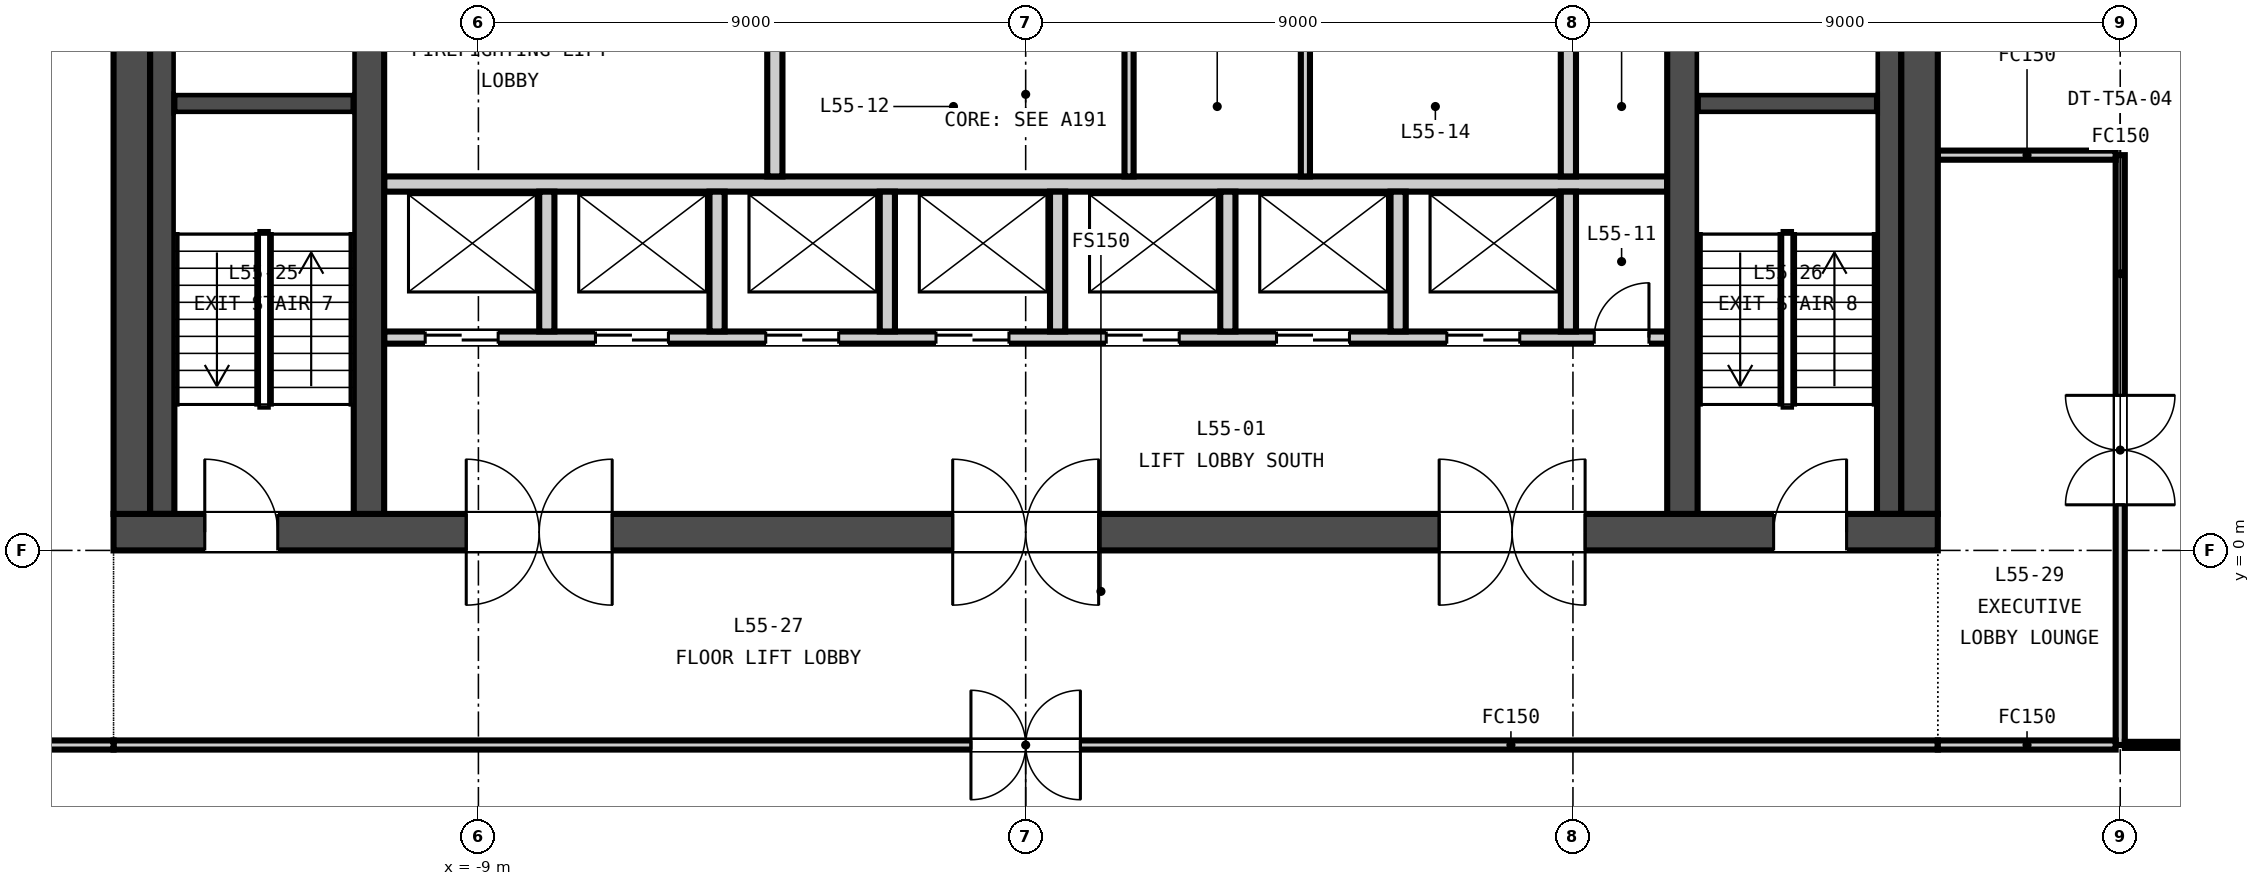
"""IFC4 building model, lengths in metres.
Left out: names, types, materials, properties, quantities, classifications, styles, units other than length and angle.
Written with IfcOpenShell. Run it as: python <this file> out.ifc"""

import sys

from ifc_helpers import new_model, si_unit, direction, frame, frame_2d, origin, place, context, subcontext, project, spatial, rectangle, extrude, element, fill, save


model = new_model("IFC4")
c1 = context("Model", 3, precision=1e-05, world=origin(), true_north=direction((0.0, 1.0)))
c2 = subcontext(c1, "Body", "Model", "MODEL_VIEW")
j1 = project(units=[si_unit("LENGTHUNIT", "METRE"), si_unit("PLANEANGLEUNIT", "RADIAN")], contexts=[c1])
p1 = place(None, origin())
s1 = spatial("IfcSite", under=j1, at=p1, CompositionType="ELEMENT")
p2 = place(p1, origin())
s2 = spatial("IfcBuilding", under=s1, at=p2, CompositionType="ELEMENT")
p3 = place(p2, frame((0.0, 0.0, 219.95)))
s3 = spatial("IfcBuildingStorey", under=s2, at=p3, CompositionType="ELEMENT", Elevation=219.95)
p4 = place(p3, frame((-15.0, 0.3, -0.15), z_axis=(0.0, 0.0, 1.0), x_axis=(1.0, 0.0, 0.0)))
e1 = element("IfcWall", 1, at=p4, inside=s3, PredefinedType="SOLIDWALL", context=c2, shape_type="SweptSolid", body=[
    extrude(rectangle(XDim=30.0, YDim=0.6, at=frame_2d((15.0, 0.0))), origin(), (0.0, 0.0, 1.0), 3.65),
])
p5 = place(p4, frame((5.8, 0.0, 0.15)))
e2 = element("IfcOpeningElement", 2, at=p5, cuts=e1, PredefinedType="OPENING", context=c2, shape_type="SweptSolid", body=[
    extrude(rectangle(XDim=2.4, YDim=2.4, at=frame_2d((1.2, 1.2))), frame((0.0, 0.31, 0.0), z_axis=(0.0, -1.0, 0.0), x_axis=(1.0, 0.0, 0.0)), (0.0, 0.0, 1.0), 0.62),
])
p6 = place(p4, frame((13.8, 0.0, 0.15)))
e3 = element("IfcOpeningElement", 3, at=p6, cuts=e1, PredefinedType="OPENING", context=c2, shape_type="SweptSolid", body=[
    extrude(rectangle(XDim=2.4, YDim=2.4, at=frame_2d((1.2, 1.2))), frame((0.0, 0.31, 0.0), z_axis=(0.0, -1.0, 0.0), x_axis=(1.0, 0.0, 0.0)), (0.0, 0.0, 1.0), 0.62),
])
p7 = place(p4, frame((21.8, 0.0, 0.15)))
e4 = element("IfcOpeningElement", 4, at=p7, cuts=e1, PredefinedType="OPENING", context=c2, shape_type="SweptSolid", body=[
    extrude(rectangle(XDim=2.4, YDim=2.4, at=frame_2d((1.2, 1.2))), frame((0.0, 0.31, 0.0), z_axis=(0.0, -1.0, 0.0), x_axis=(1.0, 0.0, 0.0)), (0.0, 0.0, 1.0), 0.62),
])
p8 = place(p4, frame((1.5, 0.0, 0.15)))
e5 = element("IfcOpeningElement", 5, at=p8, cuts=e1, PredefinedType="OPENING", context=c2, shape_type="SweptSolid", body=[
    extrude(rectangle(XDim=1.2, YDim=2.1, at=frame_2d((0.6, 1.05))), frame((0.0, 0.31, 0.0), z_axis=(0.0, -1.0, 0.0), x_axis=(1.0, 0.0, 0.0)), (0.0, 0.0, 1.0), 0.62),
])
p9 = place(p4, frame((27.3, 0.0, 0.15)))
e6 = element("IfcOpeningElement", 6, at=p9, cuts=e1, PredefinedType="OPENING", context=c2, shape_type="SweptSolid", body=[
    extrude(rectangle(XDim=1.2, YDim=2.1, at=frame_2d((0.6, 1.05))), frame((0.0, 0.31, 0.0), z_axis=(0.0, -1.0, 0.0), x_axis=(1.0, 0.0, 0.0)), (0.0, 0.0, 1.0), 0.62),
])
for number, where, z_axis, x_axis in (
    (7, (-14.7, 0.6, -0.15), (0.0, 0.0, 1.0), (0.0, 1.0, 0.0)),
    (8, (14.7, 0.6, -0.15), (0.0, 0.0, 1.0), (0.0, 1.0, 0.0)),
):
    element("IfcWall", number, at=place(p3, frame(where, z_axis=z_axis, x_axis=x_axis)), inside=s3, PredefinedType="SOLIDWALL", context=c2, shape_type="SweptSolid", body=[
        extrude(rectangle(XDim=13.8, YDim=0.6, at=frame_2d((6.9, 0.0))), origin(), (0.0, 0.0, 1.0), 3.65),
    ])
for number, where, z_axis, x_axis in (
    (9, (-10.8, 0.6, -0.15), (0.0, 0.0, 1.0), (0.0, 1.0, 0.0)),
    (10, (10.8, 0.6, -0.15), (0.0, 0.0, 1.0), (0.0, 1.0, 0.0)),
):
    element("IfcWall", number, at=place(p3, frame(where, z_axis=z_axis, x_axis=x_axis)), inside=s3, PredefinedType="SOLIDWALL", context=c2, shape_type="SweptSolid", body=[
        extrude(rectangle(XDim=13.8, YDim=0.5, at=frame_2d((6.9, 0.0))), origin(), (0.0, 0.0, 1.0), 3.65),
    ])
p10 = place(p3, frame((-10.55, 3.5, 0.0), z_axis=(0.0, 0.0, 1.0), x_axis=(1.0, 0.0, 0.0)))
e11 = element("IfcWall", 11, at=p10, inside=s3, PredefinedType="PARTITIONING", context=c2, shape_type="SweptSolid", body=[
    extrude(rectangle(XDim=21.1, YDim=0.2, at=frame_2d((10.55, 0.0))), origin(), (0.0, 0.0, 1.0), 3.5),
])
p11 = place(p10, frame((0.675, 0.0, 0.0)))
e12 = element("IfcOpeningElement", 12, at=p11, cuts=e11, PredefinedType="OPENING", context=c2, shape_type="SweptSolid", body=[
    extrude(rectangle(XDim=1.2, YDim=2.1, at=frame_2d((0.6, 1.05))), frame((0.0, 0.11, 0.0), z_axis=(0.0, -1.0, 0.0), x_axis=(1.0, 0.0, 0.0)), (0.0, 0.0, 1.0), 0.22),
])
p12 = place(p10, frame((3.475, 0.0, 0.0)))
e13 = element("IfcOpeningElement", 13, at=p12, cuts=e11, PredefinedType="OPENING", context=c2, shape_type="SweptSolid", body=[
    extrude(rectangle(XDim=1.2, YDim=2.1, at=frame_2d((0.6, 1.05))), frame((0.0, 0.11, 0.0), z_axis=(0.0, -1.0, 0.0), x_axis=(1.0, 0.0, 0.0)), (0.0, 0.0, 1.0), 0.22),
])
p13 = place(p10, frame((6.275, 0.0, 0.0)))
e14 = element("IfcOpeningElement", 14, at=p13, cuts=e11, PredefinedType="OPENING", context=c2, shape_type="SweptSolid", body=[
    extrude(rectangle(XDim=1.2, YDim=2.1, at=frame_2d((0.6, 1.05))), frame((0.0, 0.11, 0.0), z_axis=(0.0, -1.0, 0.0), x_axis=(1.0, 0.0, 0.0)), (0.0, 0.0, 1.0), 0.22),
])
p14 = place(p10, frame((9.075, 0.0, 0.0)))
e15 = element("IfcOpeningElement", 15, at=p14, cuts=e11, PredefinedType="OPENING", context=c2, shape_type="SweptSolid", body=[
    extrude(rectangle(XDim=1.2, YDim=2.1, at=frame_2d((0.6, 1.05))), frame((0.0, 0.11, 0.0), z_axis=(0.0, -1.0, 0.0), x_axis=(1.0, 0.0, 0.0)), (0.0, 0.0, 1.0), 0.22),
])
p15 = place(p10, frame((11.875, 0.0, 0.0)))
e16 = element("IfcOpeningElement", 16, at=p15, cuts=e11, PredefinedType="OPENING", context=c2, shape_type="SweptSolid", body=[
    extrude(rectangle(XDim=1.2, YDim=2.1, at=frame_2d((0.6, 1.05))), frame((0.0, 0.11, 0.0), z_axis=(0.0, -1.0, 0.0), x_axis=(1.0, 0.0, 0.0)), (0.0, 0.0, 1.0), 0.22),
])
p16 = place(p10, frame((14.675, 0.0, 0.0)))
e17 = element("IfcOpeningElement", 17, at=p16, cuts=e11, PredefinedType="OPENING", context=c2, shape_type="SweptSolid", body=[
    extrude(rectangle(XDim=1.2, YDim=2.1, at=frame_2d((0.6, 1.05))), frame((0.0, 0.11, 0.0), z_axis=(0.0, -1.0, 0.0), x_axis=(1.0, 0.0, 0.0)), (0.0, 0.0, 1.0), 0.22),
])
p17 = place(p10, frame((17.475, 0.0, 0.0)))
e18 = element("IfcOpeningElement", 18, at=p17, cuts=e11, PredefinedType="OPENING", context=c2, shape_type="SweptSolid", body=[
    extrude(rectangle(XDim=1.2, YDim=2.1, at=frame_2d((0.6, 1.05))), frame((0.0, 0.11, 0.0), z_axis=(0.0, -1.0, 0.0), x_axis=(1.0, 0.0, 0.0)), (0.0, 0.0, 1.0), 0.22),
])
p18 = place(p10, frame((19.9, 0.0, 0.0)))
e19 = element("IfcOpeningElement", 19, at=p18, cuts=e11, PredefinedType="OPENING", context=c2, shape_type="SweptSolid", body=[
    extrude(rectangle(XDim=0.9, YDim=2.1, at=frame_2d((0.45, 1.05))), frame((0.0, 0.11, 0.0), z_axis=(0.0, -1.0, 0.0), x_axis=(1.0, 0.0, 0.0)), (0.0, 0.0, 1.0), 0.22),
])
p19 = place(p3, frame((-10.55, 6.025, 0.0), z_axis=(0.0, 0.0, 1.0), x_axis=(1.0, 0.0, 0.0)))
e20 = element("IfcWall", 20, at=p19, inside=s3, PredefinedType="PARTITIONING", context=c2, shape_type="SweptSolid", body=[
    extrude(rectangle(XDim=21.1, YDim=0.25, at=frame_2d((10.55, 0.0))), origin(), (0.0, 0.0, 1.0), 3.5),
])
p20 = place(p3, frame((-4.125, 6.15, 0.0), z_axis=(0.0, 0.0, 1.0), x_axis=(0.0, 1.0, 0.0)))
e21 = element("IfcWall", 21, at=p20, inside=s3, PredefinedType="PARTITIONING", context=c2, shape_type="SweptSolid", body=[
    extrude(rectangle(XDim=4.95, YDim=0.25, at=frame_2d((2.475, 0.0))), origin(), (0.0, 0.0, 1.0), 3.5),
])
p21 = place(p20, frame((3.125, 0.0, 0.0)))
e22 = element("IfcOpeningElement", 22, at=p21, cuts=e21, PredefinedType="OPENING", context=c2, shape_type="SweptSolid", body=[
    extrude(rectangle(XDim=1.2, YDim=2.1, at=frame_2d((0.6, 1.05))), frame((0.0, 0.135, 0.0), z_axis=(0.0, -1.0, 0.0), x_axis=(1.0, 0.0, 0.0)), (0.0, 0.0, 1.0), 0.27),
])
for number, where, z_axis, x_axis in (
    (23, (-7.875, 3.6, 0.0), (0.0, 0.0, 1.0), (0.0, 1.0, 0.0)),
    (24, (-5.075, 3.6, 0.0), (0.0, 0.0, 1.0), (0.0, 1.0, 0.0)),
    (25, (-2.275, 3.6, 0.0), (0.0, 0.0, 1.0), (0.0, 1.0, 0.0)),
    (26, (0.525, 3.6, 0.0), (0.0, 0.0, 1.0), (0.0, 1.0, 0.0)),
    (27, (3.325, 3.6, 0.0), (0.0, 0.0, 1.0), (0.0, 1.0, 0.0)),
    (28, (6.125, 3.6, 0.0), (0.0, 0.0, 1.0), (0.0, 1.0, 0.0)),
    (29, (8.925, 3.6, 0.0), (0.0, 0.0, 1.0), (0.0, 1.0, 0.0)),
):
    element("IfcWall", number, at=place(p3, frame(where, z_axis=z_axis, x_axis=x_axis)), inside=s3, PredefinedType="PARTITIONING", context=c2, shape_type="SweptSolid", body=[
        extrude(rectangle(XDim=2.3, YDim=0.25, at=frame_2d((1.15, 0.0))), origin(), (0.0, 0.0, 1.0), 3.5),
    ])
for number, where, z_axis, x_axis in (
    (30, (1.7, 6.15, 0.0), (0.0, 0.0, 1.0), (0.0, 1.0, 0.0)),
    (31, (4.6, 6.15, 0.0), (0.0, 0.0, 1.0), (0.0, 1.0, 0.0)),
):
    element("IfcWall", number, at=place(p3, frame(where, z_axis=z_axis, x_axis=x_axis)), inside=s3, PredefinedType="PARTITIONING", context=c2, shape_type="SweptSolid", body=[
        extrude(rectangle(XDim=2.3, YDim=0.15, at=frame_2d((1.15, 0.0))), origin(), (0.0, 0.0, 1.0), 3.5),
    ])
p22 = place(p3, frame((8.925, 6.15, 0.0), z_axis=(0.0, 0.0, 1.0), x_axis=(0.0, 1.0, 0.0)))
e32 = element("IfcWall", 32, at=p22, inside=s3, PredefinedType="PARTITIONING", context=c2, shape_type="SweptSolid", body=[
    extrude(rectangle(XDim=2.3, YDim=0.25, at=frame_2d((1.15, 0.0))), origin(), (0.0, 0.0, 1.0), 3.5),
])
p23 = place(p3, frame((-14.0, 7.35, 0.0), z_axis=(0.0, 0.0, 1.0), x_axis=(1.0, 0.0, 0.0)))
e33 = element("IfcWall", 33, at=p23, inside=s3, PredefinedType="SOLIDWALL", context=c2, shape_type="SweptSolid", body=[
    extrude(rectangle(XDim=2.95, YDim=0.3, at=frame_2d((1.475, 0.0))), origin(), (0.0, 0.0, 1.0), 3.5),
])
p24 = place(p3, frame((-14.2, 0.6, 0.0), z_axis=(0.0, 0.0, 1.0), x_axis=(0.0, 1.0, 0.0)))
e34 = element("IfcWall", 34, at=p24, inside=s3, PredefinedType="SOLIDWALL", context=c2, shape_type="SweptSolid", body=[
    extrude(rectangle(XDim=13.8, YDim=0.4, at=frame_2d((6.9, 0.0))), origin(), (0.0, 0.0, 1.0), 3.5),
])
p25 = place(p3, frame((11.05, 7.35, 0.0), z_axis=(0.0, 0.0, 1.0), x_axis=(1.0, 0.0, 0.0)))
e35 = element("IfcWall", 35, at=p25, inside=s3, PredefinedType="SOLIDWALL", context=c2, shape_type="SweptSolid", body=[
    extrude(rectangle(XDim=2.95, YDim=0.3, at=frame_2d((1.475, 0.0))), origin(), (0.0, 0.0, 1.0), 3.5),
])
p26 = place(p3, frame((14.2, 0.6, 0.0), z_axis=(0.0, 0.0, 1.0), x_axis=(0.0, 1.0, 0.0)))
e36 = element("IfcWall", 36, at=p26, inside=s3, PredefinedType="SOLIDWALL", context=c2, shape_type="SweptSolid", body=[
    extrude(rectangle(XDim=13.8, YDim=0.4, at=frame_2d((6.9, 0.0))), origin(), (0.0, 0.0, 1.0), 3.5),
])
p27 = place(p3, frame((15.0, -3.2, 0.0), z_axis=(0.0, 0.0, 1.0), x_axis=(-1.0, 0.0, 0.0)))
e37 = element("IfcWall", 37, at=p27, inside=s3, PredefinedType="PARTITIONING", context=c2, shape_type="SweptSolid", body=[
    extrude(rectangle(XDim=30.0, YDim=0.15, at=frame_2d((15.0, 0.0))), origin(), (0.0, 0.0, 1.0), 2.751),
])
p28 = place(p27, frame((14.1, 0.0, 0.0)))
e38 = element("IfcOpeningElement", 38, at=p28, cuts=e37, PredefinedType="OPENING", context=c2, shape_type="SweptSolid", body=[
    extrude(rectangle(XDim=1.8, YDim=2.1, at=frame_2d((0.9, 1.05))), frame((0.0, 0.085, 0.0), z_axis=(0.0, -1.0, 0.0), x_axis=(1.0, 0.0, 0.0)), (0.0, 0.0, 1.0), 0.17),
])
p29 = place(p3, frame((-15.0, -3.2, 0.0), z_axis=(0.0, 0.0, 1.0), x_axis=(-1.0, 0.0, 0.0)))
e39 = element("IfcWall", 39, at=p29, inside=s3, PredefinedType="PARTITIONING", context=c2, shape_type="SweptSolid", body=[
    extrude(rectangle(XDim=3.0, YDim=0.15, at=frame_2d((1.5, 0.0))), origin(), (0.0, 0.0, 1.0), 2.751),
])
p30 = place(p3, frame((18.0, 6.5, 0.0), z_axis=(0.0, 0.0, 1.0), x_axis=(0.0, -1.0, 0.0)))
e40 = element("IfcWall", 40, at=p30, inside=s3, PredefinedType="PARTITIONING", context=c2, shape_type="SweptSolid", body=[
    extrude(rectangle(XDim=9.7, YDim=0.15, at=frame_2d((4.85, 0.0))), origin(), (0.0, 0.0, 1.0), 2.751),
])
p31 = place(p30, frame((3.95, 0.0, 0.0)))
e41 = element("IfcOpeningElement", 41, at=p31, cuts=e40, PredefinedType="OPENING", context=c2, shape_type="SweptSolid", body=[
    extrude(rectangle(XDim=1.8, YDim=2.1, at=frame_2d((0.9, 1.05))), frame((0.0, 0.085, 0.0), z_axis=(0.0, -1.0, 0.0), x_axis=(1.0, 0.0, 0.0)), (0.0, 0.0, 1.0), 0.17),
])
for number, where, z_axis, x_axis in (
    (42, (17.925, -3.2, 0.0), (0.0, 0.0, 1.0), (-1.0, 0.0, 0.0)),
    (43, (15.0, 6.5, 0.0), (0.0, 0.0, 1.0), (1.0, 0.0, 0.0)),
):
    element("IfcWall", number, at=place(p3, frame(where, z_axis=z_axis, x_axis=x_axis)), inside=s3, PredefinedType="PARTITIONING", context=c2, shape_type="SweptSolid", body=[
        extrude(rectangle(XDim=2.925, YDim=0.15, at=frame_2d((1.462, 0.0))), origin(), (0.0, 0.0, 1.0), 2.751),
    ])
p32 = place(p3, frame((18.076, -3.198, 0.0), z_axis=(0.0, 0.0, 1.0), x_axis=(1.0, 0.0, 0.0)))
e44 = element("IfcWall", 44, at=p32, inside=s3, PredefinedType="PARTITIONING", context=c2, shape_type="SweptSolid", body=[
    extrude(rectangle(XDim=8.013, YDim=0.1, at=frame_2d((4.007, 0.0))), origin(), (0.0, 0.0, 1.0), 2.751),
])
p33 = place(p11, origin())
e45 = element("IfcDoor", 45, at=p33, inside=s3, OperationType="DOUBLE_DOOR_SLIDING", PredefinedType="DOOR", context=c2, shape_type="SweptSolid", body=[
    extrude(rectangle(XDim=1.2, YDim=2.1, at=frame_2d((0.6, 1.05))), frame((0.0, 0.025, 0.0), z_axis=(0.0, -1.0, 0.0), x_axis=(1.0, 0.0, 0.0)), (0.0, 0.0, 1.0), 0.05),
])
fill(e12, e45)
p34 = place(p12, origin())
e46 = element("IfcDoor", 46, at=p34, inside=s3, OperationType="DOUBLE_DOOR_SLIDING", PredefinedType="DOOR", context=c2, shape_type="SweptSolid", body=[
    extrude(rectangle(XDim=1.2, YDim=2.1, at=frame_2d((0.6, 1.05))), frame((0.0, 0.025, 0.0), z_axis=(0.0, -1.0, 0.0), x_axis=(1.0, 0.0, 0.0)), (0.0, 0.0, 1.0), 0.05),
])
fill(e13, e46)
p35 = place(p13, origin())
e47 = element("IfcDoor", 47, at=p35, inside=s3, OperationType="DOUBLE_DOOR_SLIDING", PredefinedType="DOOR", context=c2, shape_type="SweptSolid", body=[
    extrude(rectangle(XDim=1.2, YDim=2.1, at=frame_2d((0.6, 1.05))), frame((0.0, 0.025, 0.0), z_axis=(0.0, -1.0, 0.0), x_axis=(1.0, 0.0, 0.0)), (0.0, 0.0, 1.0), 0.05),
])
fill(e14, e47)
p36 = place(p14, origin())
e48 = element("IfcDoor", 48, at=p36, inside=s3, OperationType="DOUBLE_DOOR_SLIDING", PredefinedType="DOOR", context=c2, shape_type="SweptSolid", body=[
    extrude(rectangle(XDim=1.2, YDim=2.1, at=frame_2d((0.6, 1.05))), frame((0.0, 0.025, 0.0), z_axis=(0.0, -1.0, 0.0), x_axis=(1.0, 0.0, 0.0)), (0.0, 0.0, 1.0), 0.05),
])
fill(e15, e48)
p37 = place(p15, origin())
e49 = element("IfcDoor", 49, at=p37, inside=s3, OperationType="DOUBLE_DOOR_SLIDING", PredefinedType="DOOR", context=c2, shape_type="SweptSolid", body=[
    extrude(rectangle(XDim=1.2, YDim=2.1, at=frame_2d((0.6, 1.05))), frame((0.0, 0.025, 0.0), z_axis=(0.0, -1.0, 0.0), x_axis=(1.0, 0.0, 0.0)), (0.0, 0.0, 1.0), 0.05),
])
fill(e16, e49)
p38 = place(p16, origin())
e50 = element("IfcDoor", 50, at=p38, inside=s3, OperationType="DOUBLE_DOOR_SLIDING", PredefinedType="DOOR", context=c2, shape_type="SweptSolid", body=[
    extrude(rectangle(XDim=1.2, YDim=2.1, at=frame_2d((0.6, 1.05))), frame((0.0, 0.025, 0.0), z_axis=(0.0, -1.0, 0.0), x_axis=(1.0, 0.0, 0.0)), (0.0, 0.0, 1.0), 0.05),
])
fill(e17, e50)
p39 = place(p17, origin())
e51 = element("IfcDoor", 51, at=p39, inside=s3, OperationType="DOUBLE_DOOR_SLIDING", PredefinedType="DOOR", context=c2, shape_type="SweptSolid", body=[
    extrude(rectangle(XDim=1.2, YDim=2.1, at=frame_2d((0.6, 1.05))), frame((0.0, 0.025, 0.0), z_axis=(0.0, -1.0, 0.0), x_axis=(1.0, 0.0, 0.0)), (0.0, 0.0, 1.0), 0.05),
])
fill(e18, e51)
p40 = place(p18, origin())
e52 = element("IfcDoor", 52, at=p40, inside=s3, OperationType="SINGLE_SWING_RIGHT", PredefinedType="DOOR", context=c2, shape_type="SweptSolid", body=[
    extrude(rectangle(XDim=0.9, YDim=2.1, at=frame_2d((0.45, 1.05))), frame((0.0, 0.025, 0.0), z_axis=(0.0, -1.0, 0.0), x_axis=(1.0, 0.0, 0.0)), (0.0, 0.0, 1.0), 0.05),
])
fill(e19, e52)
p41 = place(p5, origin())
e53 = element("IfcDoor", 53, at=p41, inside=s3, OperationType="DOUBLE_DOOR_DOUBLE_SWING", PredefinedType="DOOR", context=c2, shape_type="SweptSolid", body=[
    extrude(rectangle(XDim=2.4, YDim=2.4, at=frame_2d((1.2, 1.2))), frame((0.0, 0.025, 0.0), z_axis=(0.0, -1.0, 0.0), x_axis=(1.0, 0.0, 0.0)), (0.0, 0.0, 1.0), 0.05),
])
fill(e2, e53)
p42 = place(p6, origin())
e54 = element("IfcDoor", 54, at=p42, inside=s3, OperationType="DOUBLE_DOOR_DOUBLE_SWING", PredefinedType="DOOR", context=c2, shape_type="SweptSolid", body=[
    extrude(rectangle(XDim=2.4, YDim=2.4, at=frame_2d((1.2, 1.2))), frame((0.0, 0.025, 0.0), z_axis=(0.0, -1.0, 0.0), x_axis=(1.0, 0.0, 0.0)), (0.0, 0.0, 1.0), 0.05),
])
fill(e3, e54)
p43 = place(p7, origin())
e55 = element("IfcDoor", 55, at=p43, inside=s3, OperationType="DOUBLE_DOOR_DOUBLE_SWING", PredefinedType="DOOR", context=c2, shape_type="SweptSolid", body=[
    extrude(rectangle(XDim=2.4, YDim=2.4, at=frame_2d((1.2, 1.2))), frame((0.0, 0.025, 0.0), z_axis=(0.0, -1.0, 0.0), x_axis=(1.0, 0.0, 0.0)), (0.0, 0.0, 1.0), 0.05),
])
fill(e4, e55)
p44 = place(p8, origin())
e56 = element("IfcDoor", 56, at=p44, inside=s3, OperationType="SINGLE_SWING_LEFT", PredefinedType="DOOR", context=c2, shape_type="SweptSolid", body=[
    extrude(rectangle(XDim=1.2, YDim=2.1, at=frame_2d((0.6, 1.05))), frame((0.0, 0.025, 0.0), z_axis=(0.0, -1.0, 0.0), x_axis=(1.0, 0.0, 0.0)), (0.0, 0.0, 1.0), 0.05),
])
fill(e5, e56)
p45 = place(p9, origin())
e57 = element("IfcDoor", 57, at=p45, inside=s3, OperationType="SINGLE_SWING_RIGHT", PredefinedType="DOOR", context=c2, shape_type="SweptSolid", body=[
    extrude(rectangle(XDim=1.2, YDim=2.1, at=frame_2d((0.6, 1.05))), frame((0.0, 0.025, 0.0), z_axis=(0.0, -1.0, 0.0), x_axis=(1.0, 0.0, 0.0)), (0.0, 0.0, 1.0), 0.05),
])
fill(e6, e57)
p46 = place(p31, origin())
e58 = element("IfcDoor", 58, at=p46, inside=s3, OperationType="DOUBLE_DOOR_DOUBLE_SWING", PredefinedType="DOOR", context=c2, shape_type="SweptSolid", body=[
    extrude(rectangle(XDim=1.8, YDim=2.1, at=frame_2d((0.9, 1.05))), frame((0.0, 0.025, 0.0), z_axis=(0.0, -1.0, 0.0), x_axis=(1.0, 0.0, 0.0)), (0.0, 0.0, 1.0), 0.05),
])
fill(e41, e58)
p47 = place(p28, origin())
e59 = element("IfcDoor", 59, at=p47, inside=s3, OperationType="DOUBLE_DOOR_DOUBLE_SWING", PredefinedType="DOOR", context=c2, shape_type="SweptSolid", body=[
    extrude(rectangle(XDim=1.8, YDim=2.1, at=frame_2d((0.9, 1.05))), frame((0.0, 0.025, 0.0), z_axis=(0.0, -1.0, 0.0), x_axis=(1.0, 0.0, 0.0)), (0.0, 0.0, 1.0), 0.05),
])
fill(e38, e59)
save(model, sys.argv[1])
